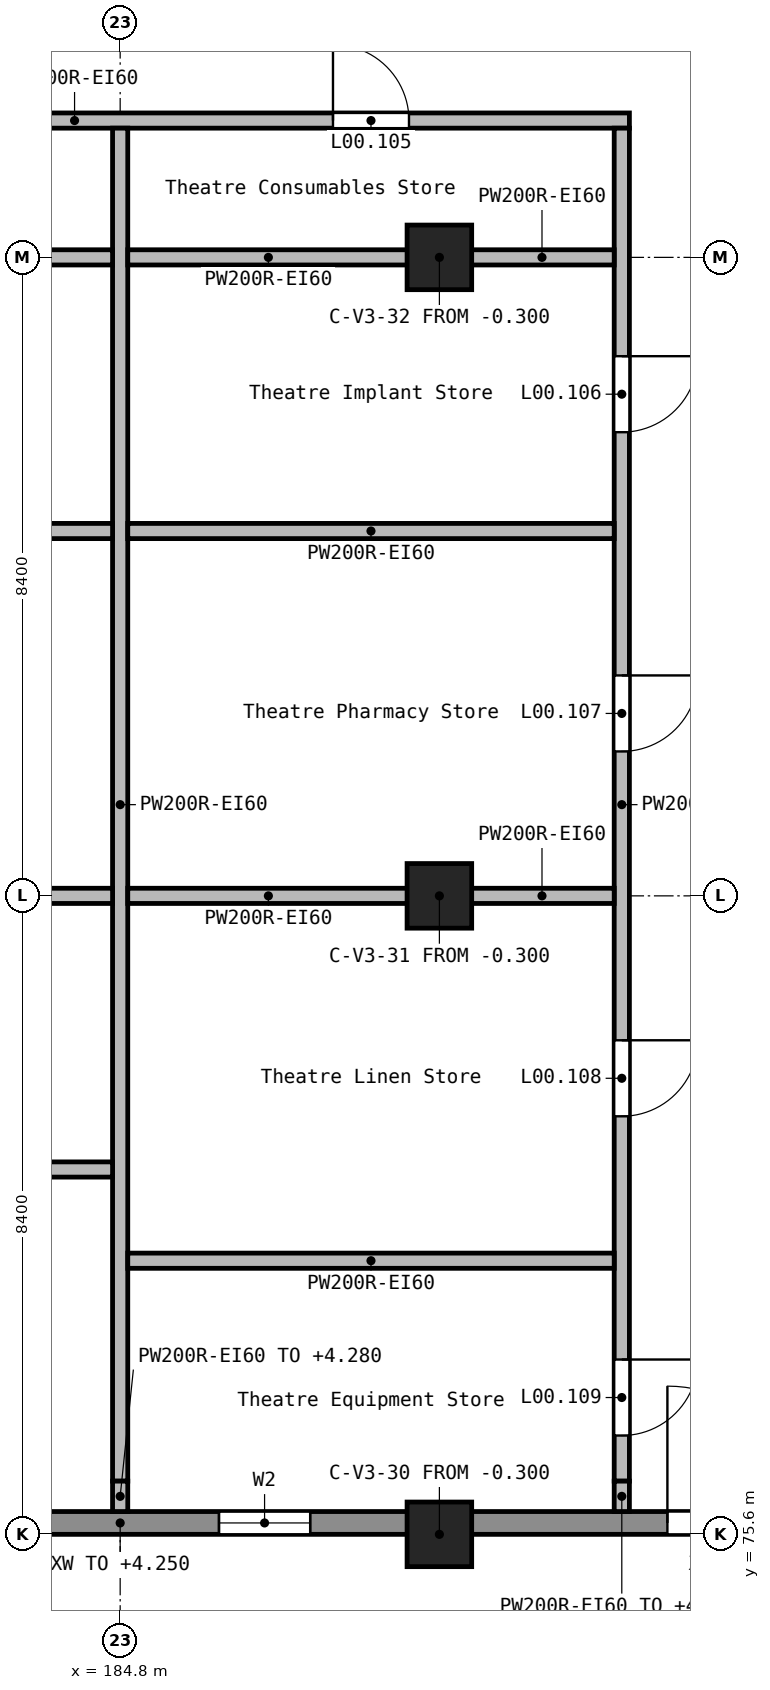
"""IFC4 building model, lengths in metres.
Left out: names, types, materials, properties, quantities, classifications, styles, units other than length and angle.
Written with IfcOpenShell. Run it as: python <this file> out.ifc"""

import sys

from ifc_helpers import new_model, si_unit, direction, frame, frame_2d, origin, origin_2d, place, context, subcontext, project, spatial, rectangle, extrude, element, fill, save


model = new_model("IFC4")
c1 = context("Model", 3, precision=1e-05, world=origin(), true_north=direction((0.0, 1.0)))
c2 = subcontext(c1, "Body", "Model", "MODEL_VIEW")
j1 = project(units=[si_unit("LENGTHUNIT", "METRE"), si_unit("PLANEANGLEUNIT", "RADIAN")], contexts=[c1])
p1 = place(None, origin())
s1 = spatial("IfcSite", under=j1, at=p1, CompositionType="ELEMENT")
p2 = place(p1, origin())
s2 = spatial("IfcBuilding", under=s1, at=p2, CompositionType="ELEMENT")
p3 = place(p2, origin())
s3 = spatial("IfcBuildingStorey", under=s2, at=p3, CompositionType="ELEMENT", Elevation=0.0)
for number, where, z_axis, x_axis in (
    (1, (189.0, 75.6, -0.3), (0.0, 0.0, 1.0), (1.0, 0.0, 0.0)),
    (2, (189.0, 84.0, -0.3), (0.0, 0.0, 1.0), (1.0, 0.0, 0.0)),
    (3, (189.0, 92.4, -0.3), (0.0, 0.0, 1.0), (1.0, 0.0, 0.0)),
):
    element("IfcColumn", number, at=place(p3, frame(where, z_axis=z_axis, x_axis=x_axis)), inside=s3, PredefinedType="COLUMN", context=c2, shape_type="SweptSolid", body=[
        extrude(rectangle(XDim=0.85, YDim=0.85, at=origin_2d()), origin(), (0.0, 0.0, 1.0), 5.7),
    ])
p4 = place(p3, frame((181.0, 75.75, 0.0), z_axis=(0.0, 0.0, 1.0), x_axis=(1.0, 0.0, 0.0)))
e4 = element("IfcWall", 4, at=p4, inside=s3, PredefinedType="STANDARD", context=c2, shape_type="SweptSolid", body=[
    extrude(rectangle(XDim=7.6, YDim=0.3, at=frame_2d((3.8, 0.0))), origin(), (0.0, 0.0, 1.0), 4.25),
])
p5 = place(p4, frame((1.3, 0.0, 1.2)))
e5 = element("IfcOpeningElement", 5, at=p5, cuts=e4, PredefinedType="OPENING", context=c2, shape_type="SweptSolid", body=[
    extrude(rectangle(XDim=1.2, YDim=1.2, at=frame_2d((0.6, 0.6))), frame((0.0, 0.16, 0.0), z_axis=(0.0, -1.0, 0.0), x_axis=(1.0, 0.0, 0.0)), (0.0, 0.0, 1.0), 0.32),
])
p6 = place(p4, frame((5.1, 0.0, 1.2)))
e6 = element("IfcOpeningElement", 6, at=p6, cuts=e4, PredefinedType="OPENING", context=c2, shape_type="SweptSolid", body=[
    extrude(rectangle(XDim=1.2, YDim=1.2, at=frame_2d((0.6, 0.6))), frame((0.0, 0.16, 0.0), z_axis=(0.0, -1.0, 0.0), x_axis=(1.0, 0.0, 0.0)), (0.0, 0.0, 1.0), 0.32),
])
p7 = place(p3, frame((189.4, 75.75, 0.0), z_axis=(0.0, 0.0, 1.0), x_axis=(1.0, 0.0, 0.0)))
e7 = element("IfcWall", 7, at=p7, inside=s3, PredefinedType="STANDARD", context=c2, shape_type="SweptSolid", body=[
    extrude(rectangle(XDim=7.6, YDim=0.3, at=frame_2d((3.8, 0.0))), origin(), (0.0, 0.0, 1.0), 4.25),
])
p8 = place(p7, frame((2.6, 0.0, 0.0)))
e8 = element("IfcOpeningElement", 8, at=p8, cuts=e7, PredefinedType="OPENING", context=c2, shape_type="SweptSolid", body=[
    extrude(rectangle(XDim=1.8, YDim=2.1, at=frame_2d((0.9, 1.05))), frame((0.0, 0.16, 0.0), z_axis=(0.0, -1.0, 0.0), x_axis=(1.0, 0.0, 0.0)), (0.0, 0.0, 1.0), 0.32),
])
p9 = place(p7, frame((5.1, 0.0, 1.2)))
e9 = element("IfcOpeningElement", 9, at=p9, cuts=e7, PredefinedType="OPENING", context=c2, shape_type="SweptSolid", body=[
    extrude(rectangle(XDim=1.2, YDim=1.2, at=frame_2d((0.6, 0.6))), frame((0.0, 0.16, 0.0), z_axis=(0.0, -1.0, 0.0), x_axis=(1.0, 0.0, 0.0)), (0.0, 0.0, 1.0), 0.32),
])
p10 = place(p3, frame((176.9, 94.2, 0.0), z_axis=(0.0, 0.0, 1.0), x_axis=(1.0, 0.0, 0.0)))
e10 = element("IfcWall", 10, at=p10, inside=s3, PredefinedType="SOLIDWALL", context=c2, shape_type="SweptSolid", body=[
    extrude(rectangle(XDim=14.6, YDim=0.2, at=frame_2d((7.3, 0.0))), origin(), (0.0, 0.0, 1.0), 5.05),
])
p11 = place(p10, frame((3.5, 0.0, 0.0)))
e11 = element("IfcOpeningElement", 11, at=p11, cuts=e10, PredefinedType="OPENING", context=c2, shape_type="SweptSolid", body=[
    extrude(rectangle(XDim=1.0, YDim=2.1, at=frame_2d((0.5, 1.05))), frame((0.0, 0.11, 0.0), z_axis=(0.0, -1.0, 0.0), x_axis=(1.0, 0.0, 0.0)), (0.0, 0.0, 1.0), 0.22),
])
p12 = place(p10, frame((10.7, 0.0, 0.0)))
e12 = element("IfcOpeningElement", 12, at=p12, cuts=e10, PredefinedType="OPENING", context=c2, shape_type="SweptSolid", body=[
    extrude(rectangle(XDim=1.0, YDim=2.1, at=frame_2d((0.5, 1.05))), frame((0.0, 0.11, 0.0), z_axis=(0.0, -1.0, 0.0), x_axis=(1.0, 0.0, 0.0)), (0.0, 0.0, 1.0), 0.22),
])
p13 = place(p3, frame((184.8, 94.1, 0.0), z_axis=(0.0, 0.0, 1.0), x_axis=(0.0, -1.0, 0.0)))
e13 = element("IfcWall", 13, at=p13, inside=s3, PredefinedType="SOLIDWALL", context=c2, shape_type="SweptSolid", body=[
    extrude(rectangle(XDim=17.8, YDim=0.2, at=frame_2d((8.9, 0.0))), origin(), (0.0, 0.0, 1.0), 5.05),
])
p14 = place(p3, frame((184.8, 76.3, 0.0), z_axis=(0.0, 0.0, 1.0), x_axis=(0.0, -1.0, 0.0)))
e14 = element("IfcWall", 14, at=p14, inside=s3, PredefinedType="SOLIDWALL", context=c2, shape_type="SweptSolid", body=[
    extrude(rectangle(XDim=0.4, YDim=0.2, at=frame_2d((0.2, 0.0))), origin(), (0.0, 0.0, 1.0), 4.28),
])
p15 = place(p3, frame((191.4, 94.1, 0.0), z_axis=(0.0, 0.0, 1.0), x_axis=(0.0, -1.0, 0.0)))
e15 = element("IfcWall", 15, at=p15, inside=s3, PredefinedType="SOLIDWALL", context=c2, shape_type="SweptSolid", body=[
    extrude(rectangle(XDim=17.8, YDim=0.2, at=frame_2d((8.9, 0.0))), origin(), (0.0, 0.0, 1.0), 5.05),
])
p16 = place(p15, frame((3.0, 0.0, 0.0)))
e16 = element("IfcOpeningElement", 16, at=p16, cuts=e15, PredefinedType="OPENING", context=c2, shape_type="SweptSolid", body=[
    extrude(rectangle(XDim=1.0, YDim=2.1, at=frame_2d((0.5, 1.05))), frame((0.0, 0.11, 0.0), z_axis=(0.0, -1.0, 0.0), x_axis=(1.0, 0.0, 0.0)), (0.0, 0.0, 1.0), 0.22),
])
p17 = place(p15, frame((7.2, 0.0, 0.0)))
e17 = element("IfcOpeningElement", 17, at=p17, cuts=e15, PredefinedType="OPENING", context=c2, shape_type="SweptSolid", body=[
    extrude(rectangle(XDim=1.0, YDim=2.1, at=frame_2d((0.5, 1.05))), frame((0.0, 0.11, 0.0), z_axis=(0.0, -1.0, 0.0), x_axis=(1.0, 0.0, 0.0)), (0.0, 0.0, 1.0), 0.22),
])
p18 = place(p15, frame((12.0, 0.0, 0.0)))
e18 = element("IfcOpeningElement", 18, at=p18, cuts=e15, PredefinedType="OPENING", context=c2, shape_type="SweptSolid", body=[
    extrude(rectangle(XDim=1.0, YDim=2.1, at=frame_2d((0.5, 1.05))), frame((0.0, 0.11, 0.0), z_axis=(0.0, -1.0, 0.0), x_axis=(1.0, 0.0, 0.0)), (0.0, 0.0, 1.0), 0.22),
])
p19 = place(p15, frame((16.2, 0.0, 0.0)))
e19 = element("IfcOpeningElement", 19, at=p19, cuts=e15, PredefinedType="OPENING", context=c2, shape_type="SweptSolid", body=[
    extrude(rectangle(XDim=1.0, YDim=2.1, at=frame_2d((0.5, 1.05))), frame((0.0, 0.11, 0.0), z_axis=(0.0, -1.0, 0.0), x_axis=(1.0, 0.0, 0.0)), (0.0, 0.0, 1.0), 0.22),
])
p20 = place(p3, frame((191.4, 76.3, 0.0), z_axis=(0.0, 0.0, 1.0), x_axis=(0.0, -1.0, 0.0)))
e20 = element("IfcWall", 20, at=p20, inside=s3, PredefinedType="SOLIDWALL", context=c2, shape_type="SweptSolid", body=[
    extrude(rectangle(XDim=0.4, YDim=0.2, at=frame_2d((0.2, 0.0))), origin(), (0.0, 0.0, 1.0), 4.28),
])
p21 = place(p3, frame((181.0, 84.0, 0.0), z_axis=(0.0, 0.0, 1.0), x_axis=(1.0, 0.0, 0.0)))
e21 = element("IfcWall", 21, at=p21, inside=s3, PredefinedType="SOLIDWALL", context=c2, shape_type="SweptSolid", body=[
    extrude(rectangle(XDim=3.7, YDim=0.2, at=frame_2d((1.85, 0.0))), origin(), (0.0, 0.0, 1.0), 5.05),
])
p22 = place(p3, frame((184.9, 84.0, 0.0), z_axis=(0.0, 0.0, 1.0), x_axis=(1.0, 0.0, 0.0)))
e22 = element("IfcWall", 22, at=p22, inside=s3, PredefinedType="SOLIDWALL", context=c2, shape_type="SweptSolid", body=[
    extrude(rectangle(XDim=3.7, YDim=0.2, at=frame_2d((1.85, 0.0))), origin(), (0.0, 0.0, 1.0), 5.05),
])
p23 = place(p3, frame((189.4, 84.0, 0.0), z_axis=(0.0, 0.0, 1.0), x_axis=(1.0, 0.0, 0.0)))
e23 = element("IfcWall", 23, at=p23, inside=s3, PredefinedType="SOLIDWALL", context=c2, shape_type="SweptSolid", body=[
    extrude(rectangle(XDim=1.9, YDim=0.2, at=frame_2d((0.95, 0.0))), origin(), (0.0, 0.0, 1.0), 5.05),
])
p24 = place(p3, frame((176.9, 88.8, 0.0), z_axis=(0.0, 0.0, 1.0), x_axis=(1.0, 0.0, 0.0)))
e24 = element("IfcWall", 24, at=p24, inside=s3, PredefinedType="SOLIDWALL", context=c2, shape_type="SweptSolid", body=[
    extrude(rectangle(XDim=7.8, YDim=0.2, at=frame_2d((3.9, 0.0))), origin(), (0.0, 0.0, 1.0), 5.05),
])
p25 = place(p3, frame((184.9, 88.8, 0.0), z_axis=(0.0, 0.0, 1.0), x_axis=(1.0, 0.0, 0.0)))
e25 = element("IfcWall", 25, at=p25, inside=s3, PredefinedType="SOLIDWALL", context=c2, shape_type="SweptSolid", body=[
    extrude(rectangle(XDim=6.4, YDim=0.2, at=frame_2d((3.2, 0.0))), origin(), (0.0, 0.0, 1.0), 5.05),
])
p26 = place(p3, frame((181.0, 92.4, 0.0), z_axis=(0.0, 0.0, 1.0), x_axis=(1.0, 0.0, 0.0)))
e26 = element("IfcWall", 26, at=p26, inside=s3, PredefinedType="SOLIDWALL", context=c2, shape_type="SweptSolid", body=[
    extrude(rectangle(XDim=3.7, YDim=0.2, at=frame_2d((1.85, 0.0))), origin(), (0.0, 0.0, 1.0), 5.05),
])
p27 = place(p3, frame((184.9, 92.4, 0.0), z_axis=(0.0, 0.0, 1.0), x_axis=(1.0, 0.0, 0.0)))
e27 = element("IfcWall", 27, at=p27, inside=s3, PredefinedType="SOLIDWALL", context=c2, shape_type="SweptSolid", body=[
    extrude(rectangle(XDim=3.7, YDim=0.2, at=frame_2d((1.85, 0.0))), origin(), (0.0, 0.0, 1.0), 5.05),
])
p28 = place(p3, frame((189.4, 92.4, 0.0), z_axis=(0.0, 0.0, 1.0), x_axis=(1.0, 0.0, 0.0)))
e28 = element("IfcWall", 28, at=p28, inside=s3, PredefinedType="SOLIDWALL", context=c2, shape_type="SweptSolid", body=[
    extrude(rectangle(XDim=1.9, YDim=0.2, at=frame_2d((0.95, 0.0))), origin(), (0.0, 0.0, 1.0), 5.05),
])
p29 = place(p3, frame((176.9, 80.4, 0.0), z_axis=(0.0, 0.0, 1.0), x_axis=(1.0, 0.0, 0.0)))
e29 = element("IfcWall", 29, at=p29, inside=s3, PredefinedType="SOLIDWALL", context=c2, shape_type="SweptSolid", body=[
    extrude(rectangle(XDim=7.8, YDim=0.2, at=frame_2d((3.9, 0.0))), origin(), (0.0, 0.0, 1.0), 5.05),
])
p30 = place(p3, frame((184.9, 79.2, 0.0), z_axis=(0.0, 0.0, 1.0), x_axis=(1.0, 0.0, 0.0)))
e30 = element("IfcWall", 30, at=p30, inside=s3, PredefinedType="SOLIDWALL", context=c2, shape_type="SweptSolid", body=[
    extrude(rectangle(XDim=6.4, YDim=0.2, at=frame_2d((3.2, 0.0))), origin(), (0.0, 0.0, 1.0), 5.05),
])
p31 = place(p8, frame((1.8, 0.0, 0.0), z_axis=(0.0, 0.0, 1.0), x_axis=(-1.0, 0.0, 0.0)))
e31 = element("IfcDoor", 31, at=p31, inside=s3, OperationType="SINGLE_SWING_LEFT", PredefinedType="DOOR", context=c2, shape_type="SweptSolid", body=[
    extrude(rectangle(XDim=1.8, YDim=2.1, at=frame_2d((0.9, 1.05))), frame((0.0, 0.025, 0.0), z_axis=(0.0, -1.0, 0.0), x_axis=(1.0, 0.0, 0.0)), (0.0, 0.0, 1.0), 0.05),
])
fill(e8, e31)
p32 = place(p6, origin())
e32 = element("IfcWindow", 32, at=p32, inside=s3, PartitioningType="SINGLE_PANEL", PredefinedType="WINDOW", context=c2, shape_type="SweptSolid", body=[
    extrude(rectangle(XDim=1.2, YDim=1.2, at=frame_2d((0.6, 0.6))), frame((0.0, 0.03, 0.0), z_axis=(0.0, -1.0, 0.0), x_axis=(1.0, 0.0, 0.0)), (0.0, 0.0, 1.0), 0.06),
])
fill(e6, e32)
p33 = place(p12, frame((1.0, 0.0, 0.0), z_axis=(0.0, 0.0, 1.0), x_axis=(-1.0, 0.0, 0.0)))
e33 = element("IfcDoor", 33, at=p33, inside=s3, OperationType="SINGLE_SWING_LEFT", PredefinedType="DOOR", context=c2, shape_type="SweptSolid", body=[
    extrude(rectangle(XDim=1.0, YDim=2.1, at=frame_2d((0.5, 1.05))), frame((0.0, 0.025, 0.0), z_axis=(0.0, -1.0, 0.0), x_axis=(1.0, 0.0, 0.0)), (0.0, 0.0, 1.0), 0.05),
])
fill(e12, e33)
p34 = place(p16, frame((1.0, 0.0, 0.0), z_axis=(0.0, 0.0, 1.0), x_axis=(-1.0, 0.0, 0.0)))
e34 = element("IfcDoor", 34, at=p34, inside=s3, OperationType="SINGLE_SWING_RIGHT", PredefinedType="DOOR", context=c2, shape_type="SweptSolid", body=[
    extrude(rectangle(XDim=1.0, YDim=2.1, at=frame_2d((0.5, 1.05))), frame((0.0, 0.025, 0.0), z_axis=(0.0, -1.0, 0.0), x_axis=(1.0, 0.0, 0.0)), (0.0, 0.0, 1.0), 0.05),
])
fill(e16, e34)
p35 = place(p17, frame((1.0, 0.0, 0.0), z_axis=(0.0, 0.0, 1.0), x_axis=(-1.0, 0.0, 0.0)))
e35 = element("IfcDoor", 35, at=p35, inside=s3, OperationType="SINGLE_SWING_RIGHT", PredefinedType="DOOR", context=c2, shape_type="SweptSolid", body=[
    extrude(rectangle(XDim=1.0, YDim=2.1, at=frame_2d((0.5, 1.05))), frame((0.0, 0.025, 0.0), z_axis=(0.0, -1.0, 0.0), x_axis=(1.0, 0.0, 0.0)), (0.0, 0.0, 1.0), 0.05),
])
fill(e17, e35)
p36 = place(p18, frame((1.0, 0.0, 0.0), z_axis=(0.0, 0.0, 1.0), x_axis=(-1.0, 0.0, 0.0)))
e36 = element("IfcDoor", 36, at=p36, inside=s3, OperationType="SINGLE_SWING_LEFT", PredefinedType="DOOR", context=c2, shape_type="SweptSolid", body=[
    extrude(rectangle(XDim=1.0, YDim=2.1, at=frame_2d((0.5, 1.05))), frame((0.0, 0.025, 0.0), z_axis=(0.0, -1.0, 0.0), x_axis=(1.0, 0.0, 0.0)), (0.0, 0.0, 1.0), 0.05),
])
fill(e18, e36)
p37 = place(p19, frame((1.0, 0.0, 0.0), z_axis=(0.0, 0.0, 1.0), x_axis=(-1.0, 0.0, 0.0)))
e37 = element("IfcDoor", 37, at=p37, inside=s3, OperationType="SINGLE_SWING_LEFT", PredefinedType="DOOR", context=c2, shape_type="SweptSolid", body=[
    extrude(rectangle(XDim=1.0, YDim=2.1, at=frame_2d((0.5, 1.05))), frame((0.0, 0.025, 0.0), z_axis=(0.0, -1.0, 0.0), x_axis=(1.0, 0.0, 0.0)), (0.0, 0.0, 1.0), 0.05),
])
fill(e19, e37)
save(model, sys.argv[1])
